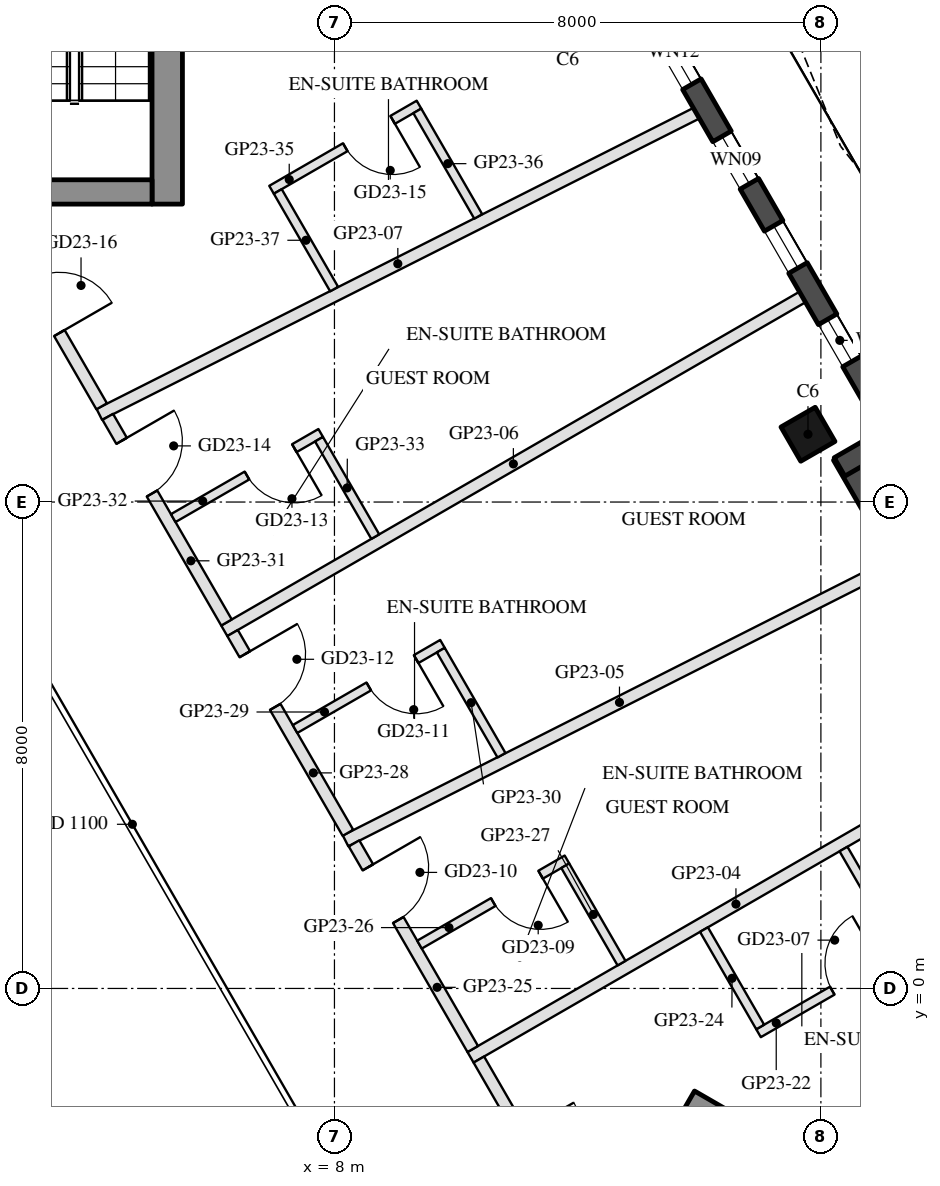
"""IFC4 building model, lengths in metres.
Left out: names, types, materials, properties, quantities, classifications, styles, units other than length and angle.
Written with IfcOpenShell. Run it as: python <this file> out.ifc"""

import sys

from ifc_helpers import new_model, si_unit, direction, frame, frame_2d, origin, origin_2d, place, context, subcontext, project, spatial, rectangle, hollow_rectangle, extrude, element, fill, save


model = new_model("IFC4")
c1 = context("Model", 3, precision=1e-05, world=origin(), true_north=direction((0.0, 1.0)))
c2 = subcontext(c1, "Body", "Model", "MODEL_VIEW")
j1 = project(units=[si_unit("LENGTHUNIT", "METRE"), si_unit("PLANEANGLEUNIT", "RADIAN")], contexts=[c1])
p1 = place(None, origin())
s1 = spatial("IfcSite", under=j1, at=p1, CompositionType="ELEMENT")
p2 = place(p1, origin())
s2 = spatial("IfcBuilding", under=s1, at=p2, CompositionType="ELEMENT")
p3 = place(p2, frame((0.0, 0.0, 246.7)))
s3 = spatial("IfcBuildingStorey", under=s2, at=p3, CompositionType="ELEMENT", Elevation=246.7)
p4 = place(p3, frame((15.788, 9.115, 0.0), z_axis=(0.0, 0.0, 1.0), x_axis=(-0.5, 0.866025403784, 0.0)))
e1 = element("IfcColumn", 1, at=p4, inside=s3, PredefinedType="COLUMN", context=c2, shape_type="SweptSolid", body=[
    extrude(hollow_rectangle(XDim=0.65, YDim=0.65, WallThickness=0.03, at=origin_2d()), origin(), (0.0, 0.0, 1.0), 3.7),
])
p5 = place(p3, frame((19.729, 2.938, 0.0), z_axis=(0.0, 0.0, 1.0), x_axis=(-0.499976430342, 0.866039011305, 0.0)))
e2 = element("IfcWall", 2, at=p5, inside=s3, PredefinedType="SOLIDWALL", context=c2, shape_type="SweptSolid", body=[
    extrude(rectangle(XDim=6.74, YDim=0.35, at=frame_2d((3.37, 0.0))), origin(), (0.0, 0.0, 1.0), 3.55),
])
p6 = place(p5, frame((1.67, 0.0, 0.0)))
e3 = element("IfcOpeningElement", 3, at=p6, cuts=e2, PredefinedType="OPENING", context=c2, shape_type="SweptSolid", body=[
    extrude(rectangle(XDim=1.5, YDim=2.4, at=frame_2d((0.75, 1.2))), frame((0.0, 0.185, 0.0), z_axis=(0.0, -1.0, 0.0), x_axis=(1.0, 0.0, 0.0)), (0.0, 0.0, 1.0), 0.37),
])
p7 = place(p5, frame((3.47, 0.0, 0.3)))
e4 = element("IfcOpeningElement", 4, at=p7, cuts=e2, PredefinedType="OPENING", context=c2, shape_type="SweptSolid", body=[
    extrude(rectangle(XDim=0.8, YDim=2.65, at=frame_2d((0.4, 1.325))), frame((0.0, 0.185, 0.0), z_axis=(0.0, -1.0, 0.0), x_axis=(1.0, 0.0, 0.0)), (0.0, 0.0, 1.0), 0.37),
])
p8 = place(p3, frame((16.306, 8.577, 0.0), z_axis=(0.0, 0.0, 1.0), x_axis=(0.866092288191, 0.499884134912, 0.0)))
e5 = element("IfcWall", 5, at=p8, inside=s3, PredefinedType="SOLIDWALL", context=c2, shape_type="SweptSolid", body=[
    extrude(rectangle(XDim=1.22, YDim=0.35, at=frame_2d((0.61, 0.0))), origin(), (0.0, 0.0, 1.0), 3.55),
])
p9 = place(p3, frame((17.299, 8.948, 0.0), z_axis=(0.0, 0.0, 1.0), x_axis=(-0.500010041276, 0.866019606374, 0.0)))
e6 = element("IfcWall", 6, at=p9, inside=s3, PredefinedType="SOLIDWALL", context=c2, shape_type="SweptSolid", body=[
    extrude(rectangle(XDim=9.7, YDim=0.35, at=frame_2d((4.85, 0.0))), origin(), (0.0, 0.0, 1.0), 3.55),
])
p10 = place(p9, frame((1.575, 0.0, 0.3)))
e7 = element("IfcOpeningElement", 7, at=p10, cuts=e6, PredefinedType="OPENING", context=c2, shape_type="SweptSolid", body=[
    extrude(rectangle(XDim=0.8, YDim=2.65, at=frame_2d((0.4, 1.325))), frame((0.0, 0.185, 0.0), z_axis=(0.0, -1.0, 0.0), x_axis=(1.0, 0.0, 0.0)), (0.0, 0.0, 1.0), 0.37),
])
p11 = place(p9, frame((3.351, 0.0, 0.3)))
e8 = element("IfcOpeningElement", 8, at=p11, cuts=e6, PredefinedType="OPENING", context=c2, shape_type="SweptSolid", body=[
    extrude(rectangle(XDim=0.8, YDim=2.65, at=frame_2d((0.4, 1.325))), frame((0.0, 0.185, 0.0), z_axis=(0.0, -1.0, 0.0), x_axis=(1.0, 0.0, 0.0)), (0.0, 0.0, 1.0), 0.37),
])
p12 = place(p9, frame((4.949, 0.0, 0.3)))
e9 = element("IfcOpeningElement", 9, at=p12, cuts=e6, PredefinedType="OPENING", context=c2, shape_type="SweptSolid", body=[
    extrude(rectangle(XDim=0.9, YDim=2.65, at=frame_2d((0.45, 1.325))), frame((0.0, 0.185, 0.0), z_axis=(0.0, -1.0, 0.0), x_axis=(1.0, 0.0, 0.0)), (0.0, 0.0, 1.0), 0.37),
])
p13 = place(p9, frame((6.84, 0.0, 0.3)))
e10 = element("IfcOpeningElement", 10, at=p13, cuts=e6, PredefinedType="OPENING", context=c2, shape_type="SweptSolid", body=[
    extrude(rectangle(XDim=1.2, YDim=2.65, at=frame_2d((0.6, 1.325))), frame((0.0, 0.185, 0.0), z_axis=(0.0, -1.0, 0.0), x_axis=(1.0, 0.0, 0.0)), (0.0, 0.0, 1.0), 0.37),
])
p14 = place(p3, frame((5.25, 12.9, 0.0), z_axis=(0.0, 0.0, 1.0), x_axis=(0.0, 1.0, 0.0)))
e11 = element("IfcWall", 11, at=p14, inside=s3, PredefinedType="SHEAR", context=c2, shape_type="SweptSolid", body=[
    extrude(rectangle(XDim=14.837, YDim=0.5, at=frame_2d((7.418, 0.0))), origin(), (0.0, 0.0, 1.0), 3.5),
])
p15 = place(p3, frame((5.0, 13.1, 0.0), z_axis=(0.0, 0.0, 1.0), x_axis=(-1.0, 0.0, 0.0)))
e12 = element("IfcWall", 12, at=p15, inside=s3, PredefinedType="SHEAR", context=c2, shape_type="SweptSolid", body=[
    extrude(rectangle(XDim=10.0, YDim=0.4, at=frame_2d((5.0, 0.0))), origin(), (0.0, 0.0, 1.0), 3.5),
])
p16 = place(p15, frame((3.55, 0.0, 0.0)))
e13 = element("IfcOpeningElement", 13, at=p16, cuts=e12, PredefinedType="OPENING", context=c2, shape_type="SweptSolid", body=[
    extrude(rectangle(XDim=1.1, YDim=2.1, at=frame_2d((0.55, 1.05))), frame((0.0, 0.21, 0.0), z_axis=(0.0, -1.0, 0.0), x_axis=(1.0, 0.0, 0.0)), (0.0, 0.0, 1.0), 0.42),
])
p17 = place(p15, frame((5.85, 0.0, 0.0)))
e14 = element("IfcOpeningElement", 14, at=p17, cuts=e12, PredefinedType="OPENING", context=c2, shape_type="SweptSolid", body=[
    extrude(rectangle(XDim=1.4, YDim=2.1, at=frame_2d((0.7, 1.05))), frame((0.0, 0.21, 0.0), z_axis=(0.0, -1.0, 0.0), x_axis=(1.0, 0.0, 0.0)), (0.0, 0.0, 1.0), 0.42),
])
p18 = place(p3, frame((13.797, -1.903, 0.0), z_axis=(0.0, 0.0, 1.0), x_axis=(0.866025009528, -0.500000682871, 0.0)))
e15 = element("IfcWall", 15, at=p18, inside=s3, PredefinedType="SHEAR", context=c2, shape_type="SweptSolid", body=[
    extrude(rectangle(XDim=14.837, YDim=0.5, at=frame_2d((7.418, 0.0))), origin(), (0.0, 0.0, 1.0), 3.5),
])
p19 = place(p3, frame((18.968, 3.907, 0.0), z_axis=(0.0, 0.0, 1.0), x_axis=(-0.866022637375, -0.500004791531, 0.0)))
e16 = element("IfcWall", 16, at=p19, inside=s3, PredefinedType="PARTITIONING", context=c2, shape_type="SweptSolid", body=[
    extrude(rectangle(XDim=10.08, YDim=0.2, at=frame_2d((5.04, 0.0))), origin(), (0.0, 0.0, 1.0), 3.16),
])
p20 = place(p3, frame((17.192, 6.982, 0.0), z_axis=(0.0, 0.0, 1.0), x_axis=(-0.892469554868, -0.451107629766, 0.0)))
e17 = element("IfcWall", 17, at=p20, inside=s3, PredefinedType="PARTITIONING", context=c2, shape_type="SweptSolid", body=[
    extrude(rectangle(XDim=10.096, YDim=0.2, at=frame_2d((5.048, 0.0))), origin(), (0.0, 0.0, 1.0), 3.16),
])
p21 = place(p3, frame((15.697, 11.372, 0.0), z_axis=(0.0, 0.0, 1.0), x_axis=(-0.866027479907, -0.499996404033, 0.0)))
e18 = element("IfcWall", 18, at=p21, inside=s3, PredefinedType="PARTITIONING", context=c2, shape_type="SweptSolid", body=[
    extrude(rectangle(XDim=10.98, YDim=0.2, at=frame_2d((5.49, 0.0))), origin(), (0.0, 0.0, 1.0), 3.16),
])
p22 = place(p3, frame((13.952, 14.395, 0.0), z_axis=(0.0, 0.0, 1.0), x_axis=(-0.892890171934, -0.450274517226, 0.0)))
e19 = element("IfcWall", 19, at=p22, inside=s3, PredefinedType="PARTITIONING", context=c2, shape_type="SweptSolid", body=[
    extrude(rectangle(XDim=10.998, YDim=0.2, at=frame_2d((5.499, 0.0))), origin(), (0.0, 0.0, 1.0), 3.16),
])
p23 = place(p3, frame((10.375, -1.169, 0.0), z_axis=(0.0, 0.0, 1.0), x_axis=(0.500055316652, -0.865993464345, 0.0)))
e20 = element("IfcWall", 20, at=p23, inside=s3, PredefinedType="PARTITIONING", context=c2, shape_type="SweptSolid", body=[
    extrude(rectangle(XDim=3.788, YDim=0.2, at=frame_2d((1.894, 0.0))), origin(), (0.0, 0.0, 1.0), 2.95),
])
p24 = place(p23, frame((1.394, 0.0, 0.0)))
e21 = element("IfcOpeningElement", 21, at=p24, cuts=e20, PredefinedType="OPENING", context=c2, shape_type="SweptSolid", body=[
    extrude(rectangle(XDim=1.0, YDim=2.1, at=frame_2d((0.5, 1.05))), frame((0.0, 0.11, 0.0), z_axis=(0.0, -1.0, 0.0), x_axis=(1.0, 0.0, 0.0)), (0.0, 0.0, 1.0), 0.22),
])
p25 = place(p3, frame((14.974, -0.737, 0.0), z_axis=(0.0, 0.0, 1.0), x_axis=(0.866018616679, 0.500011755427, 0.0)))
e22 = element("IfcWall", 22, at=p25, inside=s3, PredefinedType="PARTITIONING", context=c2, shape_type="SweptSolid", body=[
    extrude(rectangle(XDim=2.8, YDim=0.15, at=frame_2d((1.4, 0.0))), origin(), (0.0, 0.0, 1.0), 3.55),
])
p26 = place(p25, frame((1.4, 0.0, 0.0)))
e23 = element("IfcOpeningElement", 23, at=p26, cuts=e22, PredefinedType="OPENING", context=c2, shape_type="SweptSolid", body=[
    extrude(rectangle(XDim=0.9, YDim=2.1, at=frame_2d((0.45, 1.05))), frame((0.0, 0.085, 0.0), z_axis=(0.0, -1.0, 0.0), x_axis=(1.0, 0.0, 0.0)), (0.0, 0.0, 1.0), 0.17),
])
p27 = place(p3, frame((17.297, 0.691, 0.0), z_axis=(0.0, 0.0, 1.0), x_axis=(-0.499985172903, 0.866033964044, 0.0)))
e24 = element("IfcWall", 24, at=p27, inside=s3, PredefinedType="PARTITIONING", context=c2, shape_type="SweptSolid", body=[
    extrude(rectangle(XDim=1.85, YDim=0.15, at=frame_2d((0.925, 0.0))), origin(), (0.0, 0.0, 1.0), 2.95),
])
p28 = place(p3, frame((15.002, -0.634, 0.0), z_axis=(0.0, 0.0, 1.0), x_axis=(-0.500042316284, 0.866000971088, 0.0)))
e25 = element("IfcWall", 25, at=p28, inside=s3, PredefinedType="PARTITIONING", context=c2, shape_type="SweptSolid", body=[
    extrude(rectangle(XDim=1.85, YDim=0.15, at=frame_2d((0.925, 0.0))), origin(), (0.0, 0.0, 1.0), 2.95),
])
p29 = place(p3, frame((8.322, 2.386, 0.0), z_axis=(0.0, 0.0, 1.0), x_axis=(0.499998439657, -0.866026304647, 0.0)))
e26 = element("IfcWall", 26, at=p29, inside=s3, PredefinedType="PARTITIONING", context=c2, shape_type="SweptSolid", body=[
    extrude(rectangle(XDim=3.905, YDim=0.2, at=frame_2d((1.953, 0.0))), origin(), (0.0, 0.0, 1.0), 2.95),
])
p30 = place(p29, frame((0.455, 0.0, 0.0)))
e27 = element("IfcOpeningElement", 27, at=p30, cuts=e26, PredefinedType="OPENING", context=c2, shape_type="SweptSolid", body=[
    extrude(rectangle(XDim=1.0, YDim=2.1, at=frame_2d((0.5, 1.05))), frame((0.0, 0.11, 0.0), z_axis=(0.0, -1.0, 0.0), x_axis=(1.0, 0.0, 0.0)), (0.0, 0.0, 1.0), 0.22),
])
p31 = place(p3, frame((11.823, 2.121, 0.0), z_axis=(0.0, 0.0, 1.0), x_axis=(-0.866034573852, -0.49998411664, 0.0)))
e28 = element("IfcWall", 28, at=p31, inside=s3, PredefinedType="PARTITIONING", context=c2, shape_type="SweptSolid", body=[
    extrude(rectangle(XDim=2.8, YDim=0.15, at=frame_2d((1.4, 0.0))), origin(), (0.0, 0.0, 1.0), 2.95),
])
p32 = place(p31, frame((0.5, 0.0, 0.0)))
e29 = element("IfcOpeningElement", 29, at=p32, cuts=e28, PredefinedType="OPENING", context=c2, shape_type="SweptSolid", body=[
    extrude(rectangle(XDim=0.9, YDim=2.1, at=frame_2d((0.45, 1.05))), frame((0.0, 0.085, 0.0), z_axis=(0.0, -1.0, 0.0), x_axis=(1.0, 0.0, 0.0)), (0.0, 0.0, 1.0), 0.17),
])
p33 = place(p3, frame((12.721, 0.416, 0.0), z_axis=(0.0, 0.0, 1.0), x_axis=(-0.499985172903, 0.866033964044, 0.0)))
e30 = element("IfcWall", 30, at=p33, inside=s3, PredefinedType="PARTITIONING", context=c2, shape_type="SweptSolid", body=[
    extrude(rectangle(XDim=1.85, YDim=0.15, at=frame_2d((0.925, 0.0))), origin(), (0.0, 0.0, 1.0), 3.55),
])
p34 = place(p3, frame((6.325, 5.845, 0.0), z_axis=(0.0, 0.0, 1.0), x_axis=(0.499973105789, -0.866040930607, 0.0)))
e31 = element("IfcWall", 31, at=p34, inside=s3, PredefinedType="PARTITIONING", context=c2, shape_type="SweptSolid", body=[
    extrude(rectangle(XDim=3.794, YDim=0.2, at=frame_2d((1.897, 0.0))), origin(), (0.0, 0.0, 1.0), 2.95),
])
p35 = place(p34, frame((0.403, 0.0, 0.0)))
e32 = element("IfcOpeningElement", 32, at=p35, cuts=e31, PredefinedType="OPENING", context=c2, shape_type="SweptSolid", body=[
    extrude(rectangle(XDim=1.0, YDim=2.1, at=frame_2d((0.5, 1.05))), frame((0.0, 0.11, 0.0), z_axis=(0.0, -1.0, 0.0), x_axis=(1.0, 0.0, 0.0)), (0.0, 0.0, 1.0), 0.22),
])
p36 = place(p3, frame((9.776, 5.667, 0.0), z_axis=(0.0, 0.0, 1.0), x_axis=(-0.866034573852, -0.49998411664, 0.0)))
e33 = element("IfcWall", 33, at=p36, inside=s3, PredefinedType="PARTITIONING", context=c2, shape_type="SweptSolid", body=[
    extrude(rectangle(XDim=2.8, YDim=0.15, at=frame_2d((1.4, 0.0))), origin(), (0.0, 0.0, 1.0), 2.95),
])
p37 = place(p36, frame((0.5, 0.0, 0.0)))
e34 = element("IfcOpeningElement", 34, at=p37, cuts=e33, PredefinedType="OPENING", context=c2, shape_type="SweptSolid", body=[
    extrude(rectangle(XDim=0.9, YDim=2.1, at=frame_2d((0.45, 1.05))), frame((0.0, 0.085, 0.0), z_axis=(0.0, -1.0, 0.0), x_axis=(1.0, 0.0, 0.0)), (0.0, 0.0, 1.0), 0.17),
])
p38 = place(p3, frame((10.747, 3.836, 0.0), z_axis=(0.0, 0.0, 1.0), x_axis=(-0.499980071345, 0.866036909293, 0.0)))
e35 = element("IfcWall", 35, at=p38, inside=s3, PredefinedType="PARTITIONING", context=c2, shape_type="SweptSolid", body=[
    extrude(rectangle(XDim=1.996, YDim=0.15, at=frame_2d((0.998, 0.0))), origin(), (0.0, 0.0, 1.0), 2.95),
])
p39 = place(p3, frame((4.272, 9.401, 0.0), z_axis=(0.0, 0.0, 1.0), x_axis=(0.499998439657, -0.866026304647, 0.0)))
e36 = element("IfcWall", 36, at=p39, inside=s3, PredefinedType="PARTITIONING", context=c2, shape_type="SweptSolid", body=[
    extrude(rectangle(XDim=3.905, YDim=0.2, at=frame_2d((1.953, 0.0))), origin(), (0.0, 0.0, 1.0), 2.95),
])
p40 = place(p39, frame((0.456, 0.0, 0.0)))
e37 = element("IfcOpeningElement", 37, at=p40, cuts=e36, PredefinedType="OPENING", context=c2, shape_type="SweptSolid", body=[
    extrude(rectangle(XDim=1.0, YDim=2.1, at=frame_2d((0.5, 1.05))), frame((0.0, 0.11, 0.0), z_axis=(0.0, -1.0, 0.0), x_axis=(1.0, 0.0, 0.0)), (0.0, 0.0, 1.0), 0.22),
])
p41 = place(p3, frame((7.774, 9.136, 0.0), z_axis=(0.0, 0.0, 1.0), x_axis=(-0.866056369097, -0.49994636267, 0.0)))
e38 = element("IfcWall", 38, at=p41, inside=s3, PredefinedType="PARTITIONING", context=c2, shape_type="SweptSolid", body=[
    extrude(rectangle(XDim=2.8, YDim=0.15, at=frame_2d((1.4, 0.0))), origin(), (0.0, 0.0, 1.0), 2.95),
])
p42 = place(p41, frame((0.5, 0.0, 0.0)))
e39 = element("IfcOpeningElement", 39, at=p42, cuts=e38, PredefinedType="OPENING", context=c2, shape_type="SweptSolid", body=[
    extrude(rectangle(XDim=0.9, YDim=2.1, at=frame_2d((0.45, 1.05))), frame((0.0, 0.085, 0.0), z_axis=(0.0, -1.0, 0.0), x_axis=(1.0, 0.0, 0.0)), (0.0, 0.0, 1.0), 0.17),
])
p43 = place(p3, frame((8.671, 7.431, 0.0), z_axis=(0.0, 0.0, 1.0), x_axis=(-0.500042316284, 0.866000971088, 0.0)))
e40 = element("IfcWall", 40, at=p43, inside=s3, PredefinedType="PARTITIONING", context=c2, shape_type="SweptSolid", body=[
    extrude(rectangle(XDim=1.85, YDim=0.15, at=frame_2d((0.925, 0.0))), origin(), (0.0, 0.0, 1.0), 2.95),
])
p44 = place(p3, frame((2.281, 12.85, 0.0), z_axis=(0.0, 0.0, 1.0), x_axis=(0.499985062256, -0.866034027923, 0.0)))
e41 = element("IfcWall", 41, at=p44, inside=s3, PredefinedType="PARTITIONING", context=c2, shape_type="SweptSolid", body=[
    extrude(rectangle(XDim=3.782, YDim=0.2, at=frame_2d((1.891, 0.0))), origin(), (0.0, 0.0, 1.0), 2.95),
])
p45 = place(p44, frame((1.391, 0.0, 0.0)))
e42 = element("IfcOpeningElement", 42, at=p45, cuts=e41, PredefinedType="OPENING", context=c2, shape_type="SweptSolid", body=[
    extrude(rectangle(XDim=1.0, YDim=2.1, at=frame_2d((0.5, 1.05))), frame((0.0, 0.11, 0.0), z_axis=(0.0, -1.0, 0.0), x_axis=(1.0, 0.0, 0.0)), (0.0, 0.0, 1.0), 0.22),
])
p46 = place(p3, frame((9.39, 14.536, 0.0), z_axis=(0.0, 0.0, 1.0), x_axis=(-0.866034573852, -0.49998411664, 0.0)))
e43 = element("IfcWall", 43, at=p46, inside=s3, PredefinedType="PARTITIONING", context=c2, shape_type="SweptSolid", body=[
    extrude(rectangle(XDim=2.8, YDim=0.15, at=frame_2d((1.4, 0.0))), origin(), (0.0, 0.0, 1.0), 2.95),
])
p47 = place(p46, frame((0.5, 0.0, 0.0)))
e44 = element("IfcOpeningElement", 44, at=p47, cuts=e43, PredefinedType="OPENING", context=c2, shape_type="SweptSolid", body=[
    extrude(rectangle(XDim=0.9, YDim=2.1, at=frame_2d((0.45, 1.05))), frame((0.0, 0.085, 0.0), z_axis=(0.0, -1.0, 0.0), x_axis=(1.0, 0.0, 0.0)), (0.0, 0.0, 1.0), 0.17),
])
p48 = place(p3, frame((10.365, 12.698, 0.0), z_axis=(0.0, 0.0, 1.0), x_axis=(-0.500056363668, 0.86599285976, 0.0)))
e45 = element("IfcWall", 45, at=p48, inside=s3, PredefinedType="PARTITIONING", context=c2, shape_type="SweptSolid", body=[
    extrude(rectangle(XDim=2.004, YDim=0.15, at=frame_2d((1.002, 0.0))), origin(), (0.0, 0.0, 1.0), 2.95),
])
p49 = place(p3, frame((7.995, 11.502, 0.0), z_axis=(0.0, 0.0, 1.0), x_axis=(-0.4999770169, 0.866038672677, 0.0)))
e46 = element("IfcWall", 46, at=p49, inside=s3, PredefinedType="PARTITIONING", context=c2, shape_type="SweptSolid", body=[
    extrude(rectangle(XDim=1.854, YDim=0.15, at=frame_2d((0.927, 0.0))), origin(), (0.0, 0.0, 1.0), 2.95),
])
p50 = place(p10, origin())
e47 = element("IfcWindow", 47, at=p50, inside=s3, PartitioningType="SINGLE_PANEL", PredefinedType="WINDOW", context=c2, shape_type="SweptSolid", body=[
    extrude(rectangle(XDim=0.8, YDim=2.65, at=frame_2d((0.4, 1.325))), frame((0.0, 0.03, 0.0), z_axis=(0.0, -1.0, 0.0), x_axis=(1.0, 0.0, 0.0)), (0.0, 0.0, 1.0), 0.06),
])
fill(e7, e47)
p51 = place(p11, origin())
e48 = element("IfcWindow", 48, at=p51, inside=s3, PartitioningType="SINGLE_PANEL", PredefinedType="WINDOW", context=c2, shape_type="SweptSolid", body=[
    extrude(rectangle(XDim=0.8, YDim=2.65, at=frame_2d((0.4, 1.325))), frame((0.0, 0.03, 0.0), z_axis=(0.0, -1.0, 0.0), x_axis=(1.0, 0.0, 0.0)), (0.0, 0.0, 1.0), 0.06),
])
fill(e8, e48)
p52 = place(p12, origin())
e49 = element("IfcWindow", 49, at=p52, inside=s3, PartitioningType="SINGLE_PANEL", PredefinedType="WINDOW", context=c2, shape_type="SweptSolid", body=[
    extrude(rectangle(XDim=0.9, YDim=2.65, at=frame_2d((0.45, 1.325))), frame((0.0, 0.03, 0.0), z_axis=(0.0, -1.0, 0.0), x_axis=(1.0, 0.0, 0.0)), (0.0, 0.0, 1.0), 0.06),
])
fill(e9, e49)
p53 = place(p13, origin())
e50 = element("IfcWindow", 50, at=p53, inside=s3, PartitioningType="SINGLE_PANEL", PredefinedType="WINDOW", context=c2, shape_type="SweptSolid", body=[
    extrude(rectangle(XDim=1.2, YDim=2.65, at=frame_2d((0.6, 1.325))), frame((0.0, 0.03, 0.0), z_axis=(0.0, -1.0, 0.0), x_axis=(1.0, 0.0, 0.0)), (0.0, 0.0, 1.0), 0.06),
])
fill(e10, e50)
p54 = place(p26, origin())
e51 = element("IfcDoor", 51, at=p54, inside=s3, OperationType="SINGLE_SWING_RIGHT", PredefinedType="DOOR", context=c2, shape_type="SweptSolid", body=[
    extrude(rectangle(XDim=0.9, YDim=2.1, at=frame_2d((0.45, 1.05))), frame((0.0, 0.025, 0.0), z_axis=(0.0, -1.0, 0.0), x_axis=(1.0, 0.0, 0.0)), (0.0, 0.0, 1.0), 0.05),
])
fill(e23, e51)
p55 = place(p32, origin())
e52 = element("IfcDoor", 52, at=p55, inside=s3, OperationType="SINGLE_SWING_LEFT", PredefinedType="DOOR", context=c2, shape_type="SweptSolid", body=[
    extrude(rectangle(XDim=0.9, YDim=2.1, at=frame_2d((0.45, 1.05))), frame((0.0, 0.025, 0.0), z_axis=(0.0, -1.0, 0.0), x_axis=(1.0, 0.0, 0.0)), (0.0, 0.0, 1.0), 0.05),
])
fill(e29, e52)
p56 = place(p30, origin())
e53 = element("IfcDoor", 53, at=p56, inside=s3, OperationType="SINGLE_SWING_LEFT", PredefinedType="DOOR", context=c2, shape_type="SweptSolid", body=[
    extrude(rectangle(XDim=1.0, YDim=2.1, at=frame_2d((0.5, 1.05))), frame((0.0, 0.025, 0.0), z_axis=(0.0, -1.0, 0.0), x_axis=(1.0, 0.0, 0.0)), (0.0, 0.0, 1.0), 0.05),
])
fill(e27, e53)
p57 = place(p37, origin())
e54 = element("IfcDoor", 54, at=p57, inside=s3, OperationType="SINGLE_SWING_LEFT", PredefinedType="DOOR", context=c2, shape_type="SweptSolid", body=[
    extrude(rectangle(XDim=0.9, YDim=2.1, at=frame_2d((0.45, 1.05))), frame((0.0, 0.025, 0.0), z_axis=(0.0, -1.0, 0.0), x_axis=(1.0, 0.0, 0.0)), (0.0, 0.0, 1.0), 0.05),
])
fill(e34, e54)
p58 = place(p35, origin())
e55 = element("IfcDoor", 55, at=p58, inside=s3, OperationType="SINGLE_SWING_LEFT", PredefinedType="DOOR", context=c2, shape_type="SweptSolid", body=[
    extrude(rectangle(XDim=1.0, YDim=2.1, at=frame_2d((0.5, 1.05))), frame((0.0, 0.025, 0.0), z_axis=(0.0, -1.0, 0.0), x_axis=(1.0, 0.0, 0.0)), (0.0, 0.0, 1.0), 0.05),
])
fill(e32, e55)
p59 = place(p42, origin())
e56 = element("IfcDoor", 56, at=p59, inside=s3, OperationType="SINGLE_SWING_LEFT", PredefinedType="DOOR", context=c2, shape_type="SweptSolid", body=[
    extrude(rectangle(XDim=0.9, YDim=2.1, at=frame_2d((0.45, 1.05))), frame((0.0, 0.025, 0.0), z_axis=(0.0, -1.0, 0.0), x_axis=(1.0, 0.0, 0.0)), (0.0, 0.0, 1.0), 0.05),
])
fill(e39, e56)
p60 = place(p40, origin())
e57 = element("IfcDoor", 57, at=p60, inside=s3, OperationType="SINGLE_SWING_LEFT", PredefinedType="DOOR", context=c2, shape_type="SweptSolid", body=[
    extrude(rectangle(XDim=1.0, YDim=2.1, at=frame_2d((0.5, 1.05))), frame((0.0, 0.025, 0.0), z_axis=(0.0, -1.0, 0.0), x_axis=(1.0, 0.0, 0.0)), (0.0, 0.0, 1.0), 0.05),
])
fill(e37, e57)
p61 = place(p47, origin())
e58 = element("IfcDoor", 58, at=p61, inside=s3, OperationType="SINGLE_SWING_LEFT", PredefinedType="DOOR", context=c2, shape_type="SweptSolid", body=[
    extrude(rectangle(XDim=0.9, YDim=2.1, at=frame_2d((0.45, 1.05))), frame((0.0, 0.025, 0.0), z_axis=(0.0, -1.0, 0.0), x_axis=(1.0, 0.0, 0.0)), (0.0, 0.0, 1.0), 0.05),
])
fill(e44, e58)
p62 = place(p45, origin())
e59 = element("IfcDoor", 59, at=p62, inside=s3, OperationType="SINGLE_SWING_RIGHT", PredefinedType="DOOR", context=c2, shape_type="SweptSolid", body=[
    extrude(rectangle(XDim=1.0, YDim=2.1, at=frame_2d((0.5, 1.05))), frame((0.0, 0.025, 0.0), z_axis=(0.0, -1.0, 0.0), x_axis=(1.0, 0.0, 0.0)), (0.0, 0.0, 1.0), 0.05),
])
fill(e42, e59)
save(model, sys.argv[1])
